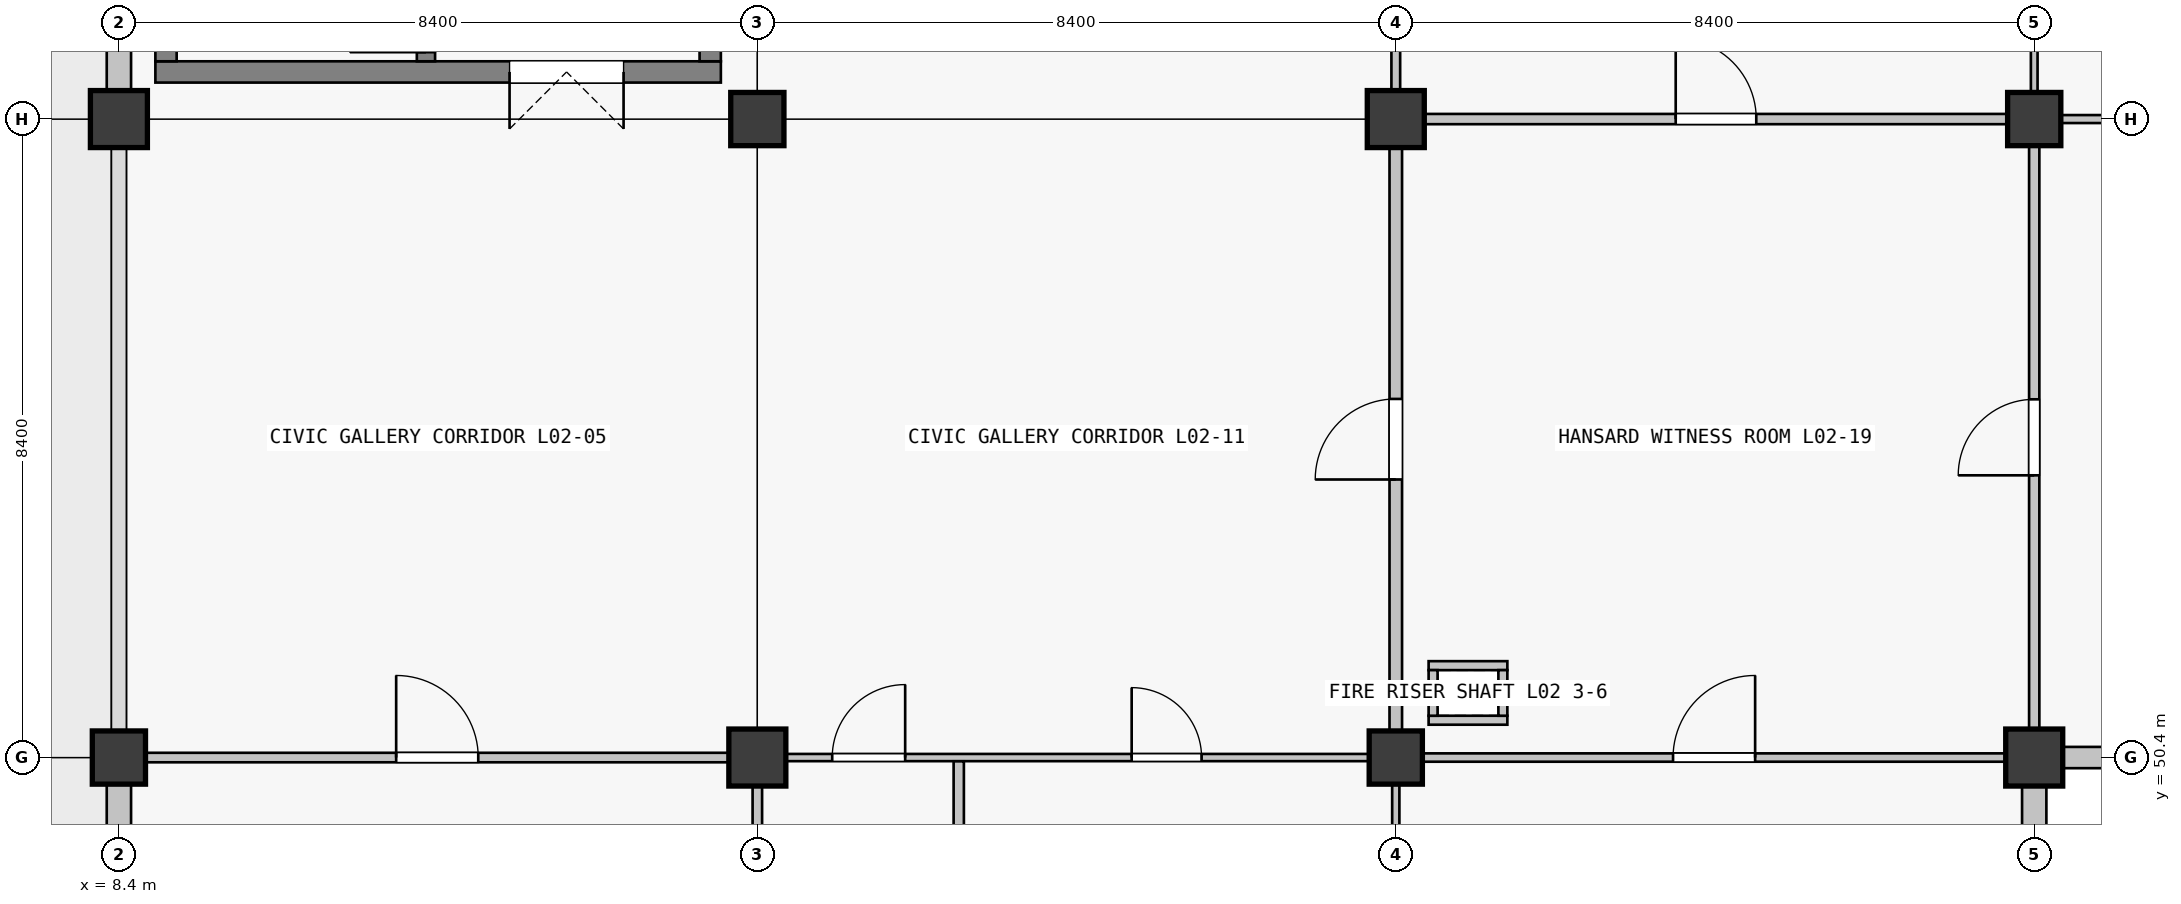
"""IFC4 building model, lengths in metres.
Left out: names, types, materials, properties, quantities, classifications, styles, units other than length and angle.
Written with IfcOpenShell. Run it as: python <this file> out.ifc"""

import sys

from ifc_helpers import new_model, si_unit, direction, frame, frame_2d, origin, origin_2d, place, context, subcontext, project, spatial, rectangle, extrude, element, fill, save


model = new_model("IFC4")
c1 = context("Model", 3, precision=1e-05, world=origin(), true_north=direction((0.0, 1.0)))
c2 = subcontext(c1, "Body", "Model", "MODEL_VIEW")
j1 = project(units=[si_unit("LENGTHUNIT", "METRE"), si_unit("PLANEANGLEUNIT", "RADIAN")], contexts=[c1])
p1 = place(None, origin())
s1 = spatial("IfcSite", under=j1, at=p1, CompositionType="ELEMENT")
p2 = place(p1, origin())
s2 = spatial("IfcBuilding", under=s1, at=p2, CompositionType="ELEMENT")
p3 = place(p2, frame((0.0, 0.0, 10.26)))
s3 = spatial("IfcBuildingStorey", under=s2, at=p3, CompositionType="ELEMENT", Elevation=10.26)
p4 = place(p3, frame((8.4, 50.4, 0.0), z_axis=(0.0, 0.0, 1.0), x_axis=(1.0, 0.0, 0.0)))
e1 = element("IfcColumn", 1, at=p4, inside=s3, PredefinedType="COLUMN", context=c2, shape_type="SweptSolid", body=[
    extrude(rectangle(XDim=0.7, YDim=0.7, at=origin_2d()), origin(), (0.0, 0.0, 1.0), 4.5),
])
for number, where, z_axis, x_axis in (
    (2, (8.4, 58.8, 0.0), (0.0, 0.0, 1.0), (1.0, 0.0, 0.0)),
    (3, (16.8, 50.4, 0.0), (0.0, 0.0, 1.0), (1.0, 0.0, 0.0)),
):
    element("IfcColumn", number, at=place(p3, frame(where, z_axis=z_axis, x_axis=x_axis)), inside=s3, PredefinedType="COLUMN", context=c2, shape_type="SweptSolid", body=[
        extrude(rectangle(XDim=0.75, YDim=0.75, at=origin_2d()), origin(), (0.0, 0.0, 1.0), 4.5),
    ])
for number, where, z_axis, x_axis in (
    (4, (16.8, 58.8, 0.0), (0.0, 0.0, 1.0), (1.0, 0.0, 0.0)),
    (5, (25.2, 50.4, 0.0), (0.0, 0.0, 1.0), (1.0, 0.0, 0.0)),
):
    element("IfcColumn", number, at=place(p3, frame(where, z_axis=z_axis, x_axis=x_axis)), inside=s3, PredefinedType="COLUMN", context=c2, shape_type="SweptSolid", body=[
        extrude(rectangle(XDim=0.7, YDim=0.7, at=origin_2d()), origin(), (0.0, 0.0, 1.0), 4.5),
    ])
for number, where, z_axis, x_axis in (
    (6, (25.2, 58.8, 0.0), (0.0, 0.0, 1.0), (1.0, 0.0, 0.0)),
    (7, (33.6, 50.4, 0.0), (0.0, 0.0, 1.0), (1.0, 0.0, 0.0)),
):
    element("IfcColumn", number, at=place(p3, frame(where, z_axis=z_axis, x_axis=x_axis)), inside=s3, PredefinedType="COLUMN", context=c2, shape_type="SweptSolid", body=[
        extrude(rectangle(XDim=0.75, YDim=0.75, at=origin_2d()), origin(), (0.0, 0.0, 1.0), 4.5),
    ])
p5 = place(p3, frame((33.6, 58.8, 0.0), z_axis=(0.0, 0.0, 1.0), x_axis=(1.0, 0.0, 0.0)))
e8 = element("IfcColumn", 8, at=p5, inside=s3, PredefinedType="COLUMN", context=c2, shape_type="SweptSolid", body=[
    extrude(rectangle(XDim=0.7, YDim=0.7, at=origin_2d()), origin(), (0.0, 0.0, 1.0), 4.5),
])
p6 = place(p3, frame((8.4, 42.376, 0.0), z_axis=(0.0, 0.0, 1.0), x_axis=(0.0, 1.0, 0.0)))
e9 = element("IfcWall", 9, at=p6, inside=s3, PredefinedType="SOLIDWALL", context=c2, shape_type="SweptSolid", body=[
    extrude(rectangle(XDim=7.673, YDim=0.32, at=frame_2d((3.836, 0.0))), origin(), (0.0, 0.0, 1.0), 3.54),
])
p7 = place(p6, frame((2.937, 0.0, 0.9)))
e10 = element("IfcOpeningElement", 10, at=p7, cuts=e9, PredefinedType="OPENING", context=c2, shape_type="SweptSolid", body=[
    extrude(rectangle(XDim=1.8, YDim=1.8, at=frame_2d((0.9, 0.9))), frame((0.0, 0.16, 0.0), z_axis=(0.0, -1.0, 0.0), x_axis=(1.0, 0.0, 0.0)), (0.0, 0.0, 1.0), 0.32),
])
p8 = place(p3, frame((8.4, 59.176, 0.0), z_axis=(0.0, 0.0, 1.0), x_axis=(0.0, 1.0, 0.0)))
e11 = element("IfcWall", 11, at=p8, inside=s3, PredefinedType="SOLIDWALL", context=c2, shape_type="SweptSolid", body=[
    extrude(rectangle(XDim=7.673, YDim=0.32, at=frame_2d((3.836, 0.0))), origin(), (0.0, 0.0, 1.0), 3.54),
])
p9 = place(p3, frame((33.6, 50.024, 0.0), z_axis=(0.0, 0.0, 1.0), x_axis=(0.0, -1.0, 0.0)))
e12 = element("IfcWall", 12, at=p9, inside=s3, PredefinedType="SOLIDWALL", context=c2, shape_type="SweptSolid", body=[
    extrude(rectangle(XDim=7.673, YDim=0.32, at=frame_2d((3.836, 0.0))), origin(), (0.0, 0.0, 1.0), 3.54),
])
p10 = place(p9, frame((3.236, 0.0, 0.9)))
e13 = element("IfcOpeningElement", 13, at=p10, cuts=e12, PredefinedType="OPENING", context=c2, shape_type="SweptSolid", body=[
    extrude(rectangle(XDim=1.2, YDim=2.1, at=frame_2d((0.6, 1.05))), frame((0.0, 0.16, 0.0), z_axis=(0.0, -1.0, 0.0), x_axis=(1.0, 0.0, 0.0)), (0.0, 0.0, 1.0), 0.32),
])
p11 = place(p3, frame((41.699, 50.4, 0.0), z_axis=(0.0, 0.0, 1.0), x_axis=(-1.0, 0.0, 0.0)))
e14 = element("IfcWall", 14, at=p11, inside=s3, PredefinedType="SOLIDWALL", context=c2, shape_type="SweptSolid", body=[
    extrude(rectangle(XDim=7.723, YDim=0.28, at=frame_2d((3.861, 0.0))), origin(), (0.0, 0.0, 1.0), 3.54),
])
p12 = place(p11, frame((2.761, 0.0, 0.9)))
e15 = element("IfcOpeningElement", 15, at=p12, cuts=e14, PredefinedType="OPENING", context=c2, shape_type="SweptSolid", body=[
    extrude(rectangle(XDim=2.2, YDim=1.35, at=frame_2d((1.1, 0.675))), frame((0.0, 0.14, 0.0), z_axis=(0.0, -1.0, 0.0), x_axis=(1.0, 0.0, 0.0)), (0.0, 0.0, 1.0), 0.28),
])
p13 = place(p3, frame((16.32, 59.42, 0.0), z_axis=(0.0, 0.0, 1.0), x_axis=(-1.0, 0.0, 0.0)))
e16 = element("IfcWall", 16, at=p13, inside=s3, PredefinedType="SHEAR", context=c2, shape_type="SweptSolid", body=[
    extrude(rectangle(XDim=7.44, YDim=0.28, at=frame_2d((3.72, 0.0))), origin(), (0.0, 0.0, 1.0), 4.5),
])
p14 = place(p13, frame((1.28, 0.0, 0.0)))
e17 = element("IfcOpeningElement", 17, at=p14, cuts=e16, PredefinedType="OPENING", context=c2, shape_type="SweptSolid", body=[
    extrude(rectangle(XDim=1.5, YDim=2.15, at=frame_2d((0.75, 1.075))), frame((0.0, 0.14, 0.0), z_axis=(0.0, -1.0, 0.0), x_axis=(1.0, 0.0, 0.0)), (0.0, 0.0, 1.0), 0.28),
])
for number, where, z_axis, x_axis in (
    (18, (9.02, 59.56, 0.0), (0.0, 0.0, 1.0), (0.0, 1.0, 0.0)),
    (19, (16.18, 66.44, 0.0), (0.0, 0.0, 1.0), (0.0, -1.0, 0.0)),
):
    element("IfcWall", number, at=place(p3, frame(where, z_axis=z_axis, x_axis=x_axis)), inside=s3, PredefinedType="SHEAR", context=c2, shape_type="SweptSolid", body=[
        extrude(rectangle(XDim=6.88, YDim=0.28, at=frame_2d((3.44, 0.0))), origin(), (0.0, 0.0, 1.0), 4.5),
    ])
p15 = place(p3, frame((12.44, 59.56, 0.0), z_axis=(0.0, 0.0, 1.0), x_axis=(0.0, 1.0, 0.0)))
e20 = element("IfcWall", 20, at=p15, inside=s3, PredefinedType="SHEAR", context=c2, shape_type="SweptSolid", body=[
    extrude(rectangle(XDim=6.88, YDim=0.24, at=frame_2d((3.44, 0.0))), origin(), (0.0, 0.0, 1.0), 4.5),
])
p16 = place(p15, frame((0.12, 0.0, 0.0)))
e21 = element("IfcOpeningElement", 21, at=p16, cuts=e20, PredefinedType="OPENING", context=c2, shape_type="SweptSolid", body=[
    extrude(rectangle(XDim=1.0, YDim=2.15, at=frame_2d((0.5, 1.075))), frame((0.0, 0.12, 0.0), z_axis=(0.0, -1.0, 0.0), x_axis=(1.0, 0.0, 0.0)), (0.0, 0.0, 1.0), 0.24),
])
for number, where, z_axis, x_axis in (
    (22, (25.632, 50.891, 0.0), (0.0, 0.0, 1.0), (1.0, 0.0, 0.0)),
    (23, (25.632, 51.609, 0.0), (0.0, 0.0, 1.0), (1.0, 0.0, 0.0)),
):
    element("IfcWall", number, at=place(p3, frame(where, z_axis=z_axis, x_axis=x_axis)), inside=s3, PredefinedType="PARTITIONING", context=c2, shape_type="SweptSolid", body=[
        extrude(rectangle(XDim=1.036, YDim=0.118, at=frame_2d((0.518, 0.0))), origin(), (0.0, 0.0, 1.0), 3.53),
    ])
for number, where, z_axis, x_axis in (
    (24, (25.691, 50.95, 0.0), (0.0, 0.0, 1.0), (0.0, 1.0, 0.0)),
    (25, (26.609, 50.95, 0.0), (0.0, 0.0, 1.0), (0.0, 1.0, 0.0)),
):
    element("IfcWall", number, at=place(p3, frame(where, z_axis=z_axis, x_axis=x_axis)), inside=s3, PredefinedType="PARTITIONING", context=c2, shape_type="SweptSolid", body=[
        extrude(rectangle(XDim=0.6, YDim=0.118, at=frame_2d((0.3, 0.0))), origin(), (0.0, 0.0, 1.0), 3.53),
    ])
p17 = place(p3, frame((8.752, 50.4, 0.0), z_axis=(0.0, 0.0, 1.0), x_axis=(1.0, 0.0, 0.0)))
e26 = element("IfcWall", 26, at=p17, inside=s3, PredefinedType="PARTITIONING", context=c2, shape_type="SweptSolid", body=[
    extrude(rectangle(XDim=7.671, YDim=0.125, at=frame_2d((3.835, 0.0))), origin(), (0.0, 0.0, 1.0), 3.37),
])
p18 = place(p17, frame((3.296, 0.0, 0.0)))
e27 = element("IfcOpeningElement", 27, at=p18, cuts=e26, PredefinedType="OPENING", context=c2, shape_type="SweptSolid", body=[
    extrude(rectangle(XDim=1.08, YDim=2.25, at=frame_2d((0.54, 1.125))), frame((0.0, 0.062, 0.0), z_axis=(0.0, -1.0, 0.0), x_axis=(1.0, 0.0, 0.0)), (0.0, 0.0, 1.0), 0.125),
])
p19 = place(p3, frame((17.177, 50.4, 0.0), z_axis=(0.0, 0.0, 1.0), x_axis=(1.0, 0.0, 0.0)))
e28 = element("IfcWall", 28, at=p19, inside=s3, PredefinedType="PARTITIONING", context=c2, shape_type="SweptSolid", body=[
    extrude(rectangle(XDim=7.671, YDim=0.095, at=frame_2d((3.835, 0.0))), origin(), (0.0, 0.0, 1.0), 3.37),
])
p20 = place(p19, frame((0.608, 0.0, 0.0)))
e29 = element("IfcOpeningElement", 29, at=p20, cuts=e28, PredefinedType="OPENING", context=c2, shape_type="SweptSolid", body=[
    extrude(rectangle(XDim=0.96, YDim=2.1, at=frame_2d((0.48, 1.05))), frame((0.0, 0.047, 0.0), z_axis=(0.0, -1.0, 0.0), x_axis=(1.0, 0.0, 0.0)), (0.0, 0.0, 1.0), 0.095),
])
p21 = place(p19, frame((4.548, 0.0, 0.0)))
e30 = element("IfcOpeningElement", 30, at=p21, cuts=e28, PredefinedType="OPENING", context=c2, shape_type="SweptSolid", body=[
    extrude(rectangle(XDim=0.92, YDim=2.1, at=frame_2d((0.46, 1.05))), frame((0.0, 0.047, 0.0), z_axis=(0.0, -1.0, 0.0), x_axis=(1.0, 0.0, 0.0)), (0.0, 0.0, 1.0), 0.095),
])
p22 = place(p3, frame((25.552, 50.4, 0.0), z_axis=(0.0, 0.0, 1.0), x_axis=(1.0, 0.0, 0.0)))
e31 = element("IfcWall", 31, at=p22, inside=s3, PredefinedType="MOVABLE", context=c2, shape_type="SweptSolid", body=[
    extrude(rectangle(XDim=7.671, YDim=0.11, at=frame_2d((3.835, 0.0))), origin(), (0.0, 0.0, 1.0), 3.37),
])
p23 = place(p22, frame((3.296, 0.0, 0.0)))
e32 = element("IfcOpeningElement", 32, at=p23, cuts=e31, PredefinedType="OPENING", context=c2, shape_type="SweptSolid", body=[
    extrude(rectangle(XDim=1.08, YDim=2.25, at=frame_2d((0.54, 1.125))), frame((0.0, 0.055, 0.0), z_axis=(0.0, -1.0, 0.0), x_axis=(1.0, 0.0, 0.0)), (0.0, 0.0, 1.0), 0.11),
])
p24 = place(p3, frame((25.577, 58.8, 0.0), z_axis=(0.0, 0.0, 1.0), x_axis=(1.0, 0.0, 0.0)))
e33 = element("IfcWall", 33, at=p24, inside=s3, PredefinedType="PARTITIONING", context=c2, shape_type="SweptSolid", body=[
    extrude(rectangle(XDim=7.671, YDim=0.135, at=frame_2d((3.835, 0.0))), origin(), (0.0, 0.0, 1.0), 3.37),
])
p25 = place(p24, frame((3.306, 0.0, 0.0)))
e34 = element("IfcOpeningElement", 34, at=p25, cuts=e33, PredefinedType="OPENING", context=c2, shape_type="SweptSolid", body=[
    extrude(rectangle(XDim=1.06, YDim=2.25, at=frame_2d((0.53, 1.125))), frame((0.0, 0.067, 0.0), z_axis=(0.0, -1.0, 0.0), x_axis=(1.0, 0.0, 0.0)), (0.0, 0.0, 1.0), 0.135),
])
p26 = place(p3, frame((33.952, 58.8, 0.0), z_axis=(0.0, 0.0, 1.0), x_axis=(1.0, 0.0, 0.0)))
e35 = element("IfcWall", 35, at=p26, inside=s3, PredefinedType="PARTITIONING", context=c2, shape_type="SweptSolid", body=[
    extrude(rectangle(XDim=7.721, YDim=0.105, at=frame_2d((3.861, 0.0))), origin(), (0.0, 0.0, 1.0), 3.37),
])
p27 = place(p26, frame((3.351, 0.0, 0.0)))
e36 = element("IfcOpeningElement", 36, at=p27, cuts=e35, PredefinedType="OPENING", context=c2, shape_type="SweptSolid", body=[
    extrude(rectangle(XDim=1.02, YDim=2.2, at=frame_2d((0.51, 1.1))), frame((0.0, 0.052, 0.0), z_axis=(0.0, -1.0, 0.0), x_axis=(1.0, 0.0, 0.0)), (0.0, 0.0, 1.0), 0.105),
])
p28 = place(p3, frame((16.8, 42.352, 0.0), z_axis=(0.0, 0.0, 1.0), x_axis=(0.0, 1.0, 0.0)))
e37 = element("IfcWall", 37, at=p28, inside=s3, PredefinedType="PARTITIONING", context=c2, shape_type="SweptSolid", body=[
    extrude(rectangle(XDim=7.671, YDim=0.125, at=frame_2d((3.835, 0.0))), origin(), (0.0, 0.0, 1.0), 3.37),
])
p29 = place(p3, frame((25.2, 42.377, 0.0), z_axis=(0.0, 0.0, 1.0), x_axis=(0.0, 1.0, 0.0)))
e38 = element("IfcWall", 38, at=p29, inside=s3, PredefinedType="PARTITIONING", context=c2, shape_type="SweptSolid", body=[
    extrude(rectangle(XDim=7.671, YDim=0.095, at=frame_2d((3.835, 0.0))), origin(), (0.0, 0.0, 1.0), 3.37),
])
p30 = place(p3, frame((25.2, 50.752, 0.0), z_axis=(0.0, 0.0, 1.0), x_axis=(0.0, 1.0, 0.0)))
e39 = element("IfcWall", 39, at=p30, inside=s3, PredefinedType="PARTITIONING", context=c2, shape_type="SweptSolid", body=[
    extrude(rectangle(XDim=7.671, YDim=0.165, at=frame_2d((3.835, 0.0))), origin(), (0.0, 0.0, 1.0), 3.37),
])
p31 = place(p30, frame((3.306, 0.0, 0.0)))
e40 = element("IfcOpeningElement", 40, at=p31, cuts=e39, PredefinedType="OPENING", context=c2, shape_type="SweptSolid", body=[
    extrude(rectangle(XDim=1.06, YDim=2.25, at=frame_2d((0.53, 1.125))), frame((0.0, 0.083, 0.0), z_axis=(0.0, -1.0, 0.0), x_axis=(1.0, 0.0, 0.0)), (0.0, 0.0, 1.0), 0.165),
])
p32 = place(p3, frame((25.2, 59.177, 0.0), z_axis=(0.0, 0.0, 1.0), x_axis=(0.0, 1.0, 0.0)))
e41 = element("IfcWall", 41, at=p32, inside=s3, PredefinedType="PARTITIONING", context=c2, shape_type="SweptSolid", body=[
    extrude(rectangle(XDim=7.671, YDim=0.115, at=frame_2d((3.835, 0.0))), origin(), (0.0, 0.0, 1.0), 3.37),
])
p33 = place(p32, frame((3.316, 0.0, 0.0)))
e42 = element("IfcOpeningElement", 42, at=p33, cuts=e41, PredefinedType="OPENING", context=c2, shape_type="SweptSolid", body=[
    extrude(rectangle(XDim=1.04, YDim=2.2, at=frame_2d((0.52, 1.1))), frame((0.0, 0.058, 0.0), z_axis=(0.0, -1.0, 0.0), x_axis=(1.0, 0.0, 0.0)), (0.0, 0.0, 1.0), 0.115),
])
p34 = place(p3, frame((33.6, 50.777, 0.0), z_axis=(0.0, 0.0, 1.0), x_axis=(0.0, 1.0, 0.0)))
e43 = element("IfcWall", 43, at=p34, inside=s3, PredefinedType="PARTITIONING", context=c2, shape_type="SweptSolid", body=[
    extrude(rectangle(XDim=7.671, YDim=0.135, at=frame_2d((3.835, 0.0))), origin(), (0.0, 0.0, 1.0), 3.37),
])
p35 = place(p34, frame((3.336, 0.0, 0.0)))
e44 = element("IfcOpeningElement", 44, at=p35, cuts=e43, PredefinedType="OPENING", context=c2, shape_type="SweptSolid", body=[
    extrude(rectangle(XDim=1.0, YDim=2.2, at=frame_2d((0.5, 1.1))), frame((0.0, 0.067, 0.0), z_axis=(0.0, -1.0, 0.0), x_axis=(1.0, 0.0, 0.0)), (0.0, 0.0, 1.0), 0.135),
])
p36 = place(p3, frame((33.6, 59.152, 0.0), z_axis=(0.0, 0.0, 1.0), x_axis=(0.0, 1.0, 0.0)))
e45 = element("IfcWall", 45, at=p36, inside=s3, PredefinedType="PARTITIONING", context=c2, shape_type="SweptSolid", body=[
    extrude(rectangle(XDim=7.671, YDim=0.088, at=frame_2d((3.835, 0.0))), origin(), (0.0, 0.0, 1.0), 3.37),
])
p37 = place(p36, frame((3.365, 0.0, 0.0)))
e46 = element("IfcOpeningElement", 46, at=p37, cuts=e45, PredefinedType="OPENING", context=c2, shape_type="SweptSolid", body=[
    extrude(rectangle(XDim=0.94, YDim=2.15, at=frame_2d((0.47, 1.075))), frame((0.0, 0.044, 0.0), z_axis=(0.0, -1.0, 0.0), x_axis=(1.0, 0.0, 0.0)), (0.0, 0.0, 1.0), 0.088),
])
p38 = place(p3, frame((19.45, 42.074, 0.0), z_axis=(0.0, 0.0, 1.0), x_axis=(0.0, 1.0, 0.0)))
e47 = element("IfcWall", 47, at=p38, inside=s3, PredefinedType="PARTITIONING", context=c2, shape_type="SweptSolid", body=[
    extrude(rectangle(XDim=8.276, YDim=0.135, at=frame_2d((4.138, 0.0))), origin(), (0.0, 0.0, 1.0), 3.37),
])
p39 = place(p14, origin())
e48 = element("IfcDoor", 48, at=p39, inside=s3, OperationType="DOUBLE_DOOR_SINGLE_SWING", PredefinedType="DOOR", context=c2, shape_type="SweptSolid", body=[
    extrude(rectangle(XDim=1.5, YDim=2.15, at=frame_2d((0.75, 1.075))), frame((0.0, 0.025, 0.0), z_axis=(0.0, -1.0, 0.0), x_axis=(1.0, 0.0, 0.0)), (0.0, 0.0, 1.0), 0.05),
])
fill(e17, e48)
p40 = place(p20, origin())
e49 = element("IfcDoor", 49, at=p40, inside=s3, OperationType="SINGLE_SWING_RIGHT", PredefinedType="DOOR", context=c2, shape_type="SweptSolid", body=[
    extrude(rectangle(XDim=0.96, YDim=2.1, at=frame_2d((0.48, 1.05))), frame((0.0, 0.025, 0.0), z_axis=(0.0, -1.0, 0.0), x_axis=(1.0, 0.0, 0.0)), (0.0, 0.0, 1.0), 0.05),
])
fill(e29, e49)
p41 = place(p21, origin())
e50 = element("IfcDoor", 50, at=p41, inside=s3, OperationType="SINGLE_SWING_LEFT", PredefinedType="DOOR", context=c2, shape_type="SweptSolid", body=[
    extrude(rectangle(XDim=0.92, YDim=2.1, at=frame_2d((0.46, 1.05))), frame((0.0, 0.025, 0.0), z_axis=(0.0, -1.0, 0.0), x_axis=(1.0, 0.0, 0.0)), (0.0, 0.0, 1.0), 0.05),
])
fill(e30, e50)
p42 = place(p18, origin())
e51 = element("IfcDoor", 51, at=p42, inside=s3, OperationType="SINGLE_SWING_LEFT", PredefinedType="DOOR", context=c2, shape_type="SweptSolid", body=[
    extrude(rectangle(XDim=1.08, YDim=2.25, at=frame_2d((0.54, 1.125))), frame((0.0, 0.025, 0.0), z_axis=(0.0, -1.0, 0.0), x_axis=(1.0, 0.0, 0.0)), (0.0, 0.0, 1.0), 0.05),
])
fill(e27, e51)
p43 = place(p31, origin())
e52 = element("IfcDoor", 52, at=p43, inside=s3, OperationType="SINGLE_SWING_LEFT", PredefinedType="DOOR", context=c2, shape_type="SweptSolid", body=[
    extrude(rectangle(XDim=1.06, YDim=2.25, at=frame_2d((0.53, 1.125))), frame((0.0, 0.025, 0.0), z_axis=(0.0, -1.0, 0.0), x_axis=(1.0, 0.0, 0.0)), (0.0, 0.0, 1.0), 0.05),
])
fill(e40, e52)
p44 = place(p35, origin())
e53 = element("IfcDoor", 53, at=p44, inside=s3, OperationType="SINGLE_SWING_LEFT", PredefinedType="DOOR", context=c2, shape_type="SweptSolid", body=[
    extrude(rectangle(XDim=1.0, YDim=2.2, at=frame_2d((0.5, 1.1))), frame((0.0, 0.025, 0.0), z_axis=(0.0, -1.0, 0.0), x_axis=(1.0, 0.0, 0.0)), (0.0, 0.0, 1.0), 0.05),
])
fill(e44, e53)
p45 = place(p23, origin())
e54 = element("IfcDoor", 54, at=p45, inside=s3, OperationType="SINGLE_SWING_RIGHT", PredefinedType="DOOR", context=c2, shape_type="SweptSolid", body=[
    extrude(rectangle(XDim=1.08, YDim=2.25, at=frame_2d((0.54, 1.125))), frame((0.0, 0.025, 0.0), z_axis=(0.0, -1.0, 0.0), x_axis=(1.0, 0.0, 0.0)), (0.0, 0.0, 1.0), 0.05),
])
fill(e32, e54)
p46 = place(p25, origin())
e55 = element("IfcDoor", 55, at=p46, inside=s3, OperationType="SINGLE_SWING_LEFT", PredefinedType="DOOR", context=c2, shape_type="SweptSolid", body=[
    extrude(rectangle(XDim=1.06, YDim=2.25, at=frame_2d((0.53, 1.125))), frame((0.0, 0.025, 0.0), z_axis=(0.0, -1.0, 0.0), x_axis=(1.0, 0.0, 0.0)), (0.0, 0.0, 1.0), 0.05),
])
fill(e34, e55)
save(model, sys.argv[1])
